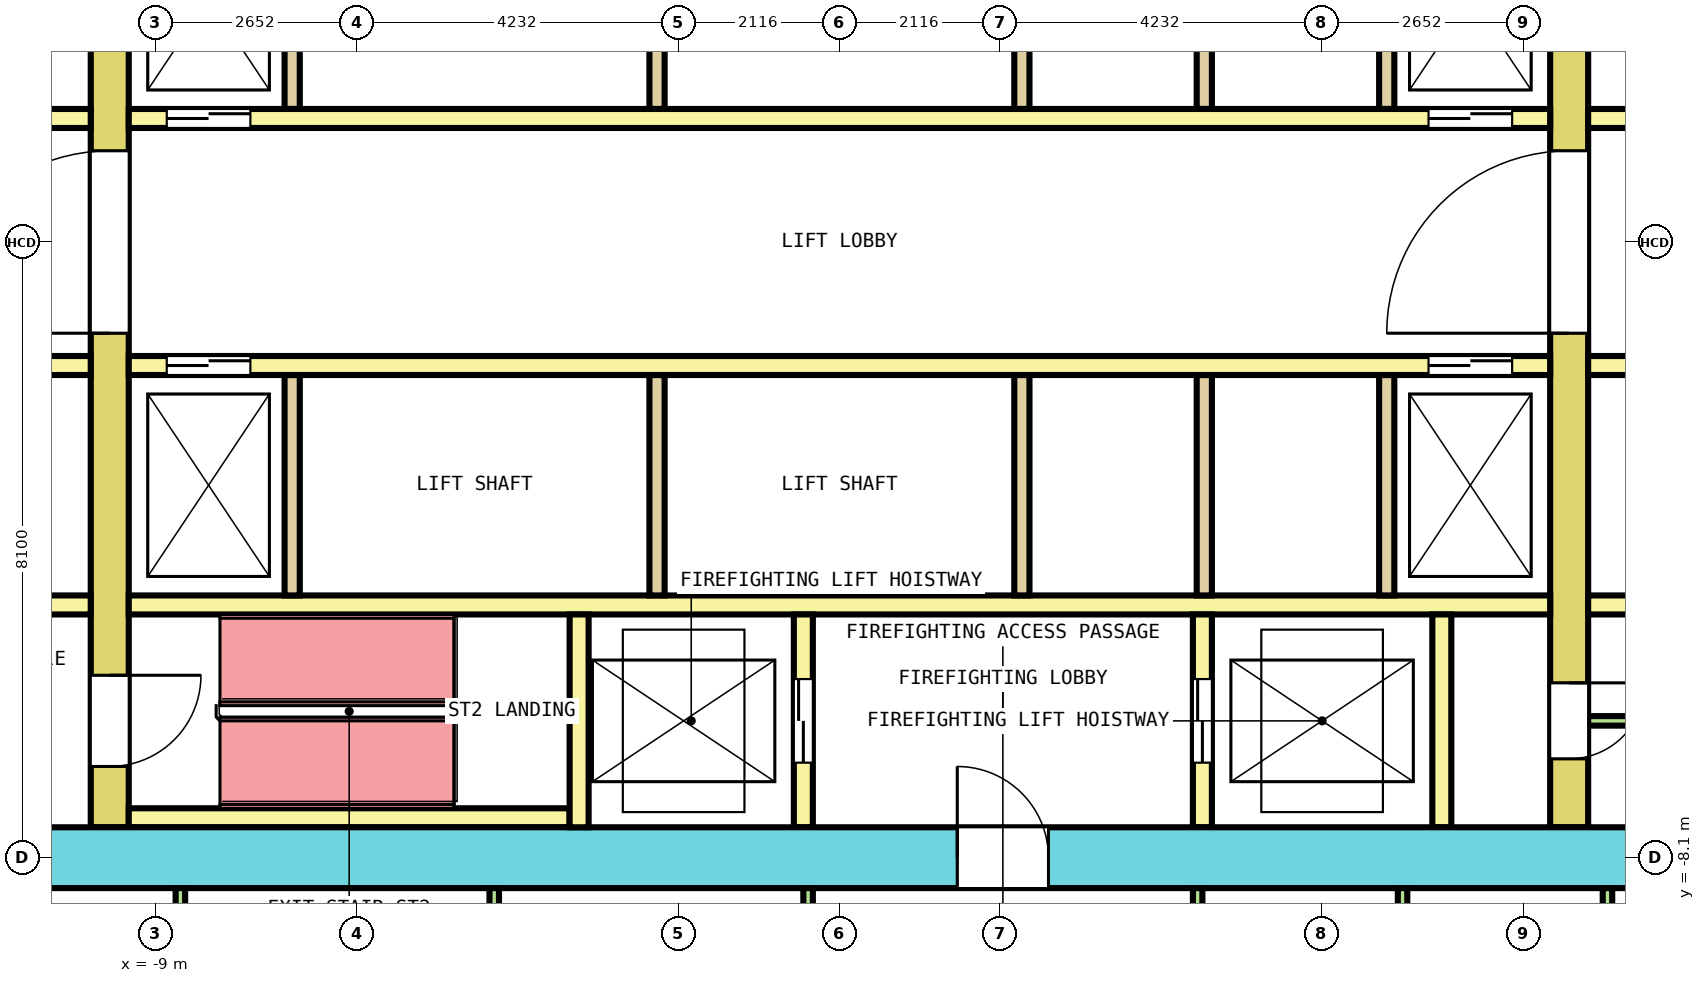
"""IFC4 building model, lengths in metres.
Left out: names, types, materials, properties, quantities, classifications, styles, units other than length and angle.
Written with IfcOpenShell. Run it as: python <this file> out.ifc"""

import sys

from ifc_helpers import new_model, si_unit, direction, frame, frame_2d, origin, place, context, subcontext, project, spatial, rectangle, extrude, element, fill, save


model = new_model("IFC4")
c1 = context("Model", 3, precision=1e-05, world=origin(), true_north=direction((0.0, 1.0)))
c2 = subcontext(c1, "Body", "Model", "MODEL_VIEW")
j1 = project(units=[si_unit("LENGTHUNIT", "METRE"), si_unit("PLANEANGLEUNIT", "RADIAN")], contexts=[c1])
p1 = place(None, origin())
s1 = spatial("IfcSite", under=j1, at=p1, CompositionType="ELEMENT")
p2 = place(p1, origin())
s2 = spatial("IfcBuilding", under=s1, at=p2, CompositionType="ELEMENT")
p3 = place(p2, frame((0.0, 0.0, 80.8)))
s3 = spatial("IfcBuildingStorey", under=s2, at=p3, CompositionType="ELEMENT", Elevation=80.8)
p4 = place(p3, frame((-12.8, -8.1, 0.0), z_axis=(0.0, 0.0, 1.0), x_axis=(1.0, 0.0, 0.0)))
e1 = element("IfcWall", 1, at=p4, inside=s3, PredefinedType="SHEAR", context=c2, shape_type="SweptSolid", body=[
    extrude(rectangle(XDim=25.6, YDim=0.8, at=frame_2d((12.8, 0.0))), origin(), (0.0, 0.0, 1.0), 4.1),
])
p5 = place(p4, frame((14.35, 0.0, 0.0)))
e2 = element("IfcOpeningElement", 2, at=p5, cuts=e1, PredefinedType="OPENING", context=c2, shape_type="SweptSolid", body=[
    extrude(rectangle(XDim=1.2, YDim=2.1, at=frame_2d((0.6, 1.05))), frame((0.0, 0.41, 0.0), z_axis=(0.0, -1.0, 0.0), x_axis=(1.0, 0.0, 0.0)), (0.0, 0.0, 1.0), 0.82),
])
p6 = place(p3, frame((-9.6, -7.7, 0.0), z_axis=(0.0, 0.0, 1.0), x_axis=(0.0, 1.0, 0.0)))
e3 = element("IfcWall", 3, at=p6, inside=s3, PredefinedType="SHEAR", context=c2, shape_type="SweptSolid", body=[
    extrude(rectangle(XDim=15.4, YDim=0.5, at=frame_2d((7.7, 0.0))), origin(), (0.0, 0.0, 1.0), 4.1),
])
p7 = place(p6, frame((6.5, 0.0, 0.0)))
e4 = element("IfcOpeningElement", 4, at=p7, cuts=e3, PredefinedType="OPENING", context=c2, shape_type="SweptSolid", body=[
    extrude(rectangle(XDim=2.4, YDim=2.1, at=frame_2d((1.2, 1.05))), frame((0.0, 0.26, 0.0), z_axis=(0.0, -1.0, 0.0), x_axis=(1.0, 0.0, 0.0)), (0.0, 0.0, 1.0), 0.52),
])
p8 = place(p6, frame((13.4, 0.0, 0.0)))
e5 = element("IfcOpeningElement", 5, at=p8, cuts=e3, PredefinedType="OPENING", context=c2, shape_type="SweptSolid", body=[
    extrude(rectangle(XDim=1.2, YDim=2.1, at=frame_2d((0.6, 1.05))), frame((0.0, 0.26, 0.0), z_axis=(0.0, -1.0, 0.0), x_axis=(1.0, 0.0, 0.0)), (0.0, 0.0, 1.0), 0.52),
])
p9 = place(p6, frame((0.8, 0.0, 0.0)))
e6 = element("IfcOpeningElement", 6, at=p9, cuts=e3, PredefinedType="OPENING", context=c2, shape_type="SweptSolid", body=[
    extrude(rectangle(XDim=1.2, YDim=2.1, at=frame_2d((0.6, 1.05))), frame((0.0, 0.26, 0.0), z_axis=(0.0, -1.0, 0.0), x_axis=(1.0, 0.0, 0.0)), (0.0, 0.0, 1.0), 0.52),
])
p10 = place(p3, frame((9.6, -7.7, 0.0), z_axis=(0.0, 0.0, 1.0), x_axis=(0.0, 1.0, 0.0)))
e7 = element("IfcWall", 7, at=p10, inside=s3, PredefinedType="SHEAR", context=c2, shape_type="SweptSolid", body=[
    extrude(rectangle(XDim=15.4, YDim=0.5, at=frame_2d((7.7, 0.0))), origin(), (0.0, 0.0, 1.0), 4.1),
])
p11 = place(p10, frame((6.5, 0.0, 0.0)))
e8 = element("IfcOpeningElement", 8, at=p11, cuts=e7, PredefinedType="OPENING", context=c2, shape_type="SweptSolid", body=[
    extrude(rectangle(XDim=2.4, YDim=2.1, at=frame_2d((1.2, 1.05))), frame((0.0, 0.26, 0.0), z_axis=(0.0, -1.0, 0.0), x_axis=(1.0, 0.0, 0.0)), (0.0, 0.0, 1.0), 0.52),
])
p12 = place(p10, frame((13.4, 0.0, 0.0)))
e9 = element("IfcOpeningElement", 9, at=p12, cuts=e7, PredefinedType="OPENING", context=c2, shape_type="SweptSolid", body=[
    extrude(rectangle(XDim=1.2, YDim=2.1, at=frame_2d((0.6, 1.05))), frame((0.0, 0.26, 0.0), z_axis=(0.0, -1.0, 0.0), x_axis=(1.0, 0.0, 0.0)), (0.0, 0.0, 1.0), 0.52),
])
p13 = place(p10, frame((0.9, 0.0, 0.0)))
e10 = element("IfcOpeningElement", 10, at=p13, cuts=e7, PredefinedType="OPENING", context=c2, shape_type="SweptSolid", body=[
    extrude(rectangle(XDim=1.0, YDim=2.1, at=frame_2d((0.5, 1.05))), frame((0.0, 0.26, 0.0), z_axis=(0.0, -1.0, 0.0), x_axis=(1.0, 0.0, 0.0)), (0.0, 0.0, 1.0), 0.52),
])
p14 = place(p3, frame((-12.8, 1.625, 0.0), z_axis=(0.0, 0.0, 1.0), x_axis=(1.0, 0.0, 0.0)))
e11 = element("IfcWall", 11, at=p14, inside=s3, PredefinedType="SOLIDWALL", context=c2, shape_type="SweptSolid", body=[
    extrude(rectangle(XDim=2.95, YDim=0.25, at=frame_2d((1.475, 0.0))), origin(), (0.0, 0.0, 1.0), 4.1),
])
p15 = place(p14, frame((0.925, 0.0, 0.0)))
e12 = element("IfcOpeningElement", 12, at=p15, cuts=e11, PredefinedType="OPENING", context=c2, shape_type="SweptSolid", body=[
    extrude(rectangle(XDim=1.1, YDim=2.1, at=frame_2d((0.55, 1.05))), frame((0.0, 0.135, 0.0), z_axis=(0.0, -1.0, 0.0), x_axis=(1.0, 0.0, 0.0)), (0.0, 0.0, 1.0), 0.27),
])
p16 = place(p3, frame((-9.35, 1.625, 0.0), z_axis=(0.0, 0.0, 1.0), x_axis=(1.0, 0.0, 0.0)))
e13 = element("IfcWall", 13, at=p16, inside=s3, PredefinedType="SOLIDWALL", context=c2, shape_type="SweptSolid", body=[
    extrude(rectangle(XDim=18.7, YDim=0.25, at=frame_2d((9.35, 0.0))), origin(), (0.0, 0.0, 1.0), 4.1),
])
p17 = place(p16, frame((0.5, 0.0, 0.0)))
e14 = element("IfcOpeningElement", 14, at=p17, cuts=e13, PredefinedType="OPENING", context=c2, shape_type="SweptSolid", body=[
    extrude(rectangle(XDim=1.1, YDim=2.1, at=frame_2d((0.55, 1.05))), frame((0.0, 0.135, 0.0), z_axis=(0.0, -1.0, 0.0), x_axis=(1.0, 0.0, 0.0)), (0.0, 0.0, 1.0), 0.27),
])
p18 = place(p16, frame((17.1, 0.0, 0.0)))
e15 = element("IfcOpeningElement", 15, at=p18, cuts=e13, PredefinedType="OPENING", context=c2, shape_type="SweptSolid", body=[
    extrude(rectangle(XDim=1.1, YDim=2.1, at=frame_2d((0.55, 1.05))), frame((0.0, 0.135, 0.0), z_axis=(0.0, -1.0, 0.0), x_axis=(1.0, 0.0, 0.0)), (0.0, 0.0, 1.0), 0.27),
])
p19 = place(p3, frame((9.85, 1.625, 0.0), z_axis=(0.0, 0.0, 1.0), x_axis=(1.0, 0.0, 0.0)))
e16 = element("IfcWall", 16, at=p19, inside=s3, PredefinedType="SOLIDWALL", context=c2, shape_type="SweptSolid", body=[
    extrude(rectangle(XDim=2.95, YDim=0.25, at=frame_2d((1.475, 0.0))), origin(), (0.0, 0.0, 1.0), 4.1),
])
p20 = place(p19, frame((0.925, 0.0, 0.0)))
e17 = element("IfcOpeningElement", 17, at=p20, cuts=e16, PredefinedType="OPENING", context=c2, shape_type="SweptSolid", body=[
    extrude(rectangle(XDim=1.1, YDim=2.1, at=frame_2d((0.55, 1.05))), frame((0.0, 0.135, 0.0), z_axis=(0.0, -1.0, 0.0), x_axis=(1.0, 0.0, 0.0)), (0.0, 0.0, 1.0), 0.27),
])
for number, where, z_axis, x_axis in (
    (18, (-7.2, 1.75, 0.0), (0.0, 0.0, 1.0), (0.0, 1.0, 0.0)),
    (19, (-2.4, 1.75, 0.0), (0.0, 0.0, 1.0), (0.0, 1.0, 0.0)),
    (20, (2.4, 1.75, 0.0), (0.0, 0.0, 1.0), (0.0, 1.0, 0.0)),
    (21, (4.8, 1.75, 0.0), (0.0, 0.0, 1.0), (0.0, 1.0, 0.0)),
    (22, (7.2, 1.75, 0.0), (0.0, 0.0, 1.0), (0.0, 1.0, 0.0)),
):
    element("IfcWall", number, at=place(p3, frame(where, z_axis=z_axis, x_axis=x_axis)), inside=s3, PredefinedType="SOLIDWALL", context=c2, shape_type="SweptSolid", body=[
        extrude(rectangle(XDim=2.9, YDim=0.2, at=frame_2d((1.45, 0.0))), origin(), (0.0, 0.0, 1.0), 4.1),
    ])
p21 = place(p3, frame((-12.8, -1.625, 0.0), z_axis=(0.0, 0.0, 1.0), x_axis=(1.0, 0.0, 0.0)))
e23 = element("IfcWall", 23, at=p21, inside=s3, PredefinedType="SOLIDWALL", context=c2, shape_type="SweptSolid", body=[
    extrude(rectangle(XDim=2.95, YDim=0.25, at=frame_2d((1.475, 0.0))), origin(), (0.0, 0.0, 1.0), 4.1),
])
p22 = place(p21, frame((0.925, 0.0, 0.0)))
e24 = element("IfcOpeningElement", 24, at=p22, cuts=e23, PredefinedType="OPENING", context=c2, shape_type="SweptSolid", body=[
    extrude(rectangle(XDim=1.1, YDim=2.1, at=frame_2d((0.55, 1.05))), frame((0.0, 0.135, 0.0), z_axis=(0.0, -1.0, 0.0), x_axis=(1.0, 0.0, 0.0)), (0.0, 0.0, 1.0), 0.27),
])
p23 = place(p3, frame((-9.35, -1.625, 0.0), z_axis=(0.0, 0.0, 1.0), x_axis=(1.0, 0.0, 0.0)))
e25 = element("IfcWall", 25, at=p23, inside=s3, PredefinedType="SOLIDWALL", context=c2, shape_type="SweptSolid", body=[
    extrude(rectangle(XDim=18.7, YDim=0.25, at=frame_2d((9.35, 0.0))), origin(), (0.0, 0.0, 1.0), 4.1),
])
p24 = place(p23, frame((0.5, 0.0, 0.0)))
e26 = element("IfcOpeningElement", 26, at=p24, cuts=e25, PredefinedType="OPENING", context=c2, shape_type="SweptSolid", body=[
    extrude(rectangle(XDim=1.1, YDim=2.1, at=frame_2d((0.55, 1.05))), frame((0.0, 0.135, 0.0), z_axis=(0.0, -1.0, 0.0), x_axis=(1.0, 0.0, 0.0)), (0.0, 0.0, 1.0), 0.27),
])
p25 = place(p23, frame((17.1, 0.0, 0.0)))
e27 = element("IfcOpeningElement", 27, at=p25, cuts=e25, PredefinedType="OPENING", context=c2, shape_type="SweptSolid", body=[
    extrude(rectangle(XDim=1.1, YDim=2.1, at=frame_2d((0.55, 1.05))), frame((0.0, 0.135, 0.0), z_axis=(0.0, -1.0, 0.0), x_axis=(1.0, 0.0, 0.0)), (0.0, 0.0, 1.0), 0.27),
])
p26 = place(p3, frame((9.85, -1.625, 0.0), z_axis=(0.0, 0.0, 1.0), x_axis=(1.0, 0.0, 0.0)))
e28 = element("IfcWall", 28, at=p26, inside=s3, PredefinedType="SOLIDWALL", context=c2, shape_type="SweptSolid", body=[
    extrude(rectangle(XDim=2.95, YDim=0.25, at=frame_2d((1.475, 0.0))), origin(), (0.0, 0.0, 1.0), 4.1),
])
p27 = place(p26, frame((0.925, 0.0, 0.0)))
e29 = element("IfcOpeningElement", 29, at=p27, cuts=e28, PredefinedType="OPENING", context=c2, shape_type="SweptSolid", body=[
    extrude(rectangle(XDim=1.1, YDim=2.1, at=frame_2d((0.55, 1.05))), frame((0.0, 0.135, 0.0), z_axis=(0.0, -1.0, 0.0), x_axis=(1.0, 0.0, 0.0)), (0.0, 0.0, 1.0), 0.27),
])
p28 = place(p3, frame((-12.8, -4.775, 0.0), z_axis=(0.0, 0.0, 1.0), x_axis=(1.0, 0.0, 0.0)))
e30 = element("IfcWall", 30, at=p28, inside=s3, PredefinedType="SOLIDWALL", context=c2, shape_type="SweptSolid", body=[
    extrude(rectangle(XDim=2.95, YDim=0.25, at=frame_2d((1.475, 0.0))), origin(), (0.0, 0.0, 1.0), 4.1),
])
p29 = place(p3, frame((-9.35, -4.775, 0.0), z_axis=(0.0, 0.0, 1.0), x_axis=(1.0, 0.0, 0.0)))
e31 = element("IfcWall", 31, at=p29, inside=s3, PredefinedType="SOLIDWALL", context=c2, shape_type="SweptSolid", body=[
    extrude(rectangle(XDim=18.7, YDim=0.25, at=frame_2d((9.35, 0.0))), origin(), (0.0, 0.0, 1.0), 4.1),
])
p30 = place(p3, frame((9.85, -4.775, 0.0), z_axis=(0.0, 0.0, 1.0), x_axis=(1.0, 0.0, 0.0)))
e32 = element("IfcWall", 32, at=p30, inside=s3, PredefinedType="SOLIDWALL", context=c2, shape_type="SweptSolid", body=[
    extrude(rectangle(XDim=2.95, YDim=0.25, at=frame_2d((1.475, 0.0))), origin(), (0.0, 0.0, 1.0), 4.1),
])
for number, where, z_axis, x_axis in (
    (33, (-7.2, -4.65, 0.0), (0.0, 0.0, 1.0), (0.0, 1.0, 0.0)),
    (34, (-2.4, -4.65, 0.0), (0.0, 0.0, 1.0), (0.0, 1.0, 0.0)),
    (35, (2.4, -4.65, 0.0), (0.0, 0.0, 1.0), (0.0, 1.0, 0.0)),
    (36, (4.8, -4.65, 0.0), (0.0, 0.0, 1.0), (0.0, 1.0, 0.0)),
    (37, (7.2, -4.65, 0.0), (0.0, 0.0, 1.0), (0.0, 1.0, 0.0)),
):
    element("IfcWall", number, at=place(p3, frame(where, z_axis=z_axis, x_axis=x_axis)), inside=s3, PredefinedType="SOLIDWALL", context=c2, shape_type="SweptSolid", body=[
        extrude(rectangle(XDim=2.9, YDim=0.2, at=frame_2d((1.45, 0.0))), origin(), (0.0, 0.0, 1.0), 4.1),
    ])
p31 = place(p3, frame((-9.35, -7.575, 0.0), z_axis=(0.0, 0.0, 1.0), x_axis=(1.0, 0.0, 0.0)))
e38 = element("IfcWall", 38, at=p31, inside=s3, PredefinedType="SOLIDWALL", context=c2, shape_type="SweptSolid", body=[
    extrude(rectangle(XDim=5.8, YDim=0.25, at=frame_2d((2.9, 0.0))), origin(), (0.0, 0.0, 1.0), 4.1),
])
p32 = place(p3, frame((-3.425, -7.7, 0.0), z_axis=(0.0, 0.0, 1.0), x_axis=(0.0, 1.0, 0.0)))
e39 = element("IfcWall", 39, at=p32, inside=s3, PredefinedType="SOLIDWALL", context=c2, shape_type="SweptSolid", body=[
    extrude(rectangle(XDim=2.8, YDim=0.25, at=frame_2d((1.4, 0.0))), origin(), (0.0, 0.0, 1.0), 4.1),
])
p33 = place(p3, frame((-0.475, -7.7, 0.0), z_axis=(0.0, 0.0, 1.0), x_axis=(0.0, 1.0, 0.0)))
e40 = element("IfcWall", 40, at=p33, inside=s3, PredefinedType="SOLIDWALL", context=c2, shape_type="SweptSolid", body=[
    extrude(rectangle(XDim=2.8, YDim=0.25, at=frame_2d((1.4, 0.0))), origin(), (0.0, 0.0, 1.0), 4.1),
])
p34 = place(p33, frame((0.85, 0.0, 0.0)))
e41 = element("IfcOpeningElement", 41, at=p34, cuts=e40, PredefinedType="OPENING", context=c2, shape_type="SweptSolid", body=[
    extrude(rectangle(XDim=1.1, YDim=2.1, at=frame_2d((0.55, 1.05))), frame((0.0, 0.135, 0.0), z_axis=(0.0, -1.0, 0.0), x_axis=(1.0, 0.0, 0.0)), (0.0, 0.0, 1.0), 0.27),
])
p35 = place(p3, frame((4.775, -7.7, 0.0), z_axis=(0.0, 0.0, 1.0), x_axis=(0.0, 1.0, 0.0)))
e42 = element("IfcWall", 42, at=p35, inside=s3, PredefinedType="SOLIDWALL", context=c2, shape_type="SweptSolid", body=[
    extrude(rectangle(XDim=2.8, YDim=0.25, at=frame_2d((1.4, 0.0))), origin(), (0.0, 0.0, 1.0), 4.1),
])
p36 = place(p35, frame((0.85, 0.0, 0.0)))
e43 = element("IfcOpeningElement", 43, at=p36, cuts=e42, PredefinedType="OPENING", context=c2, shape_type="SweptSolid", body=[
    extrude(rectangle(XDim=1.1, YDim=2.1, at=frame_2d((0.55, 1.05))), frame((0.0, 0.135, 0.0), z_axis=(0.0, -1.0, 0.0), x_axis=(1.0, 0.0, 0.0)), (0.0, 0.0, 1.0), 0.27),
])
p37 = place(p3, frame((7.925, -7.7, 0.0), z_axis=(0.0, 0.0, 1.0), x_axis=(0.0, 1.0, 0.0)))
e44 = element("IfcWall", 44, at=p37, inside=s3, PredefinedType="SOLIDWALL", context=c2, shape_type="SweptSolid", body=[
    extrude(rectangle(XDim=2.8, YDim=0.25, at=frame_2d((1.4, 0.0))), origin(), (0.0, 0.0, 1.0), 4.1),
])
p38 = place(p3, frame((9.85, -6.3, 0.0), z_axis=(0.0, 0.0, 1.0), x_axis=(1.0, 0.0, 0.0)))
e45 = element("IfcWall", 45, at=p38, inside=s3, PredefinedType="PARTITIONING", context=c2, shape_type="SweptSolid", body=[
    extrude(rectangle(XDim=2.95, YDim=0.125, at=frame_2d((1.475, 0.0))), origin(), (0.0, 0.0, 1.0), 4.1),
])
for number, where, z_axis, x_axis in (
    (46, (-8.671, -10.4, 0.0), (0.0, 0.0, 1.0), (0.0, 1.0, 0.0)),
    (47, (-4.542, -10.4, 0.0), (0.0, 0.0, 1.0), (0.0, 1.0, 0.0)),
    (48, (-0.413, -10.4, 0.0), (0.0, 0.0, 1.0), (0.0, 1.0, 0.0)),
    (49, (4.712, -10.4, 0.0), (0.0, 0.0, 1.0), (0.0, 1.0, 0.0)),
    (50, (7.408, -10.4, 0.0), (0.0, 0.0, 1.0), (0.0, 1.0, 0.0)),
    (51, (10.104, -10.4, 0.0), (0.0, 0.0, 1.0), (0.0, 1.0, 0.0)),
):
    element("IfcWall", number, at=place(p3, frame(where, z_axis=z_axis, x_axis=x_axis)), inside=s3, PredefinedType="PARTITIONING", context=c2, shape_type="SweptSolid", body=[
        extrude(rectangle(XDim=1.9, YDim=0.125, at=frame_2d((0.95, 0.0))), origin(), (0.0, 0.0, 1.0), 4.1),
    ])
p39 = place(p17, origin())
e52 = element("IfcDoor", 52, at=p39, inside=s3, OperationType="DOUBLE_DOOR_SLIDING", PredefinedType="DOOR", context=c2, shape_type="SweptSolid", body=[
    extrude(rectangle(XDim=1.1, YDim=2.1, at=frame_2d((0.55, 1.05))), frame((0.0, 0.075, 0.0), z_axis=(0.0, -1.0, 0.0), x_axis=(1.0, 0.0, 0.0)), (0.0, 0.0, 1.0), 0.15),
])
fill(e14, e52)
p40 = place(p18, origin())
e53 = element("IfcDoor", 53, at=p40, inside=s3, OperationType="DOUBLE_DOOR_SLIDING", PredefinedType="DOOR", context=c2, shape_type="SweptSolid", body=[
    extrude(rectangle(XDim=1.1, YDim=2.1, at=frame_2d((0.55, 1.05))), frame((0.0, 0.075, 0.0), z_axis=(0.0, -1.0, 0.0), x_axis=(1.0, 0.0, 0.0)), (0.0, 0.0, 1.0), 0.15),
])
fill(e15, e53)
p41 = place(p24, origin())
e54 = element("IfcDoor", 54, at=p41, inside=s3, OperationType="DOUBLE_DOOR_SLIDING", PredefinedType="DOOR", context=c2, shape_type="SweptSolid", body=[
    extrude(rectangle(XDim=1.1, YDim=2.1, at=frame_2d((0.55, 1.05))), frame((0.0, 0.075, 0.0), z_axis=(0.0, -1.0, 0.0), x_axis=(1.0, 0.0, 0.0)), (0.0, 0.0, 1.0), 0.15),
])
fill(e26, e54)
p42 = place(p25, origin())
e55 = element("IfcDoor", 55, at=p42, inside=s3, OperationType="DOUBLE_DOOR_SLIDING", PredefinedType="DOOR", context=c2, shape_type="SweptSolid", body=[
    extrude(rectangle(XDim=1.1, YDim=2.1, at=frame_2d((0.55, 1.05))), frame((0.0, 0.075, 0.0), z_axis=(0.0, -1.0, 0.0), x_axis=(1.0, 0.0, 0.0)), (0.0, 0.0, 1.0), 0.15),
])
fill(e27, e55)
p43 = place(p34, origin())
e56 = element("IfcDoor", 56, at=p43, inside=s3, OperationType="DOUBLE_DOOR_SLIDING", PredefinedType="DOOR", context=c2, shape_type="SweptSolid", body=[
    extrude(rectangle(XDim=1.1, YDim=2.1, at=frame_2d((0.55, 1.05))), frame((0.0, 0.075, 0.0), z_axis=(0.0, -1.0, 0.0), x_axis=(1.0, 0.0, 0.0)), (0.0, 0.0, 1.0), 0.15),
])
fill(e41, e56)
p44 = place(p36, origin())
e57 = element("IfcDoor", 57, at=p44, inside=s3, OperationType="DOUBLE_DOOR_SLIDING", PredefinedType="DOOR", context=c2, shape_type="SweptSolid", body=[
    extrude(rectangle(XDim=1.1, YDim=2.1, at=frame_2d((0.55, 1.05))), frame((0.0, 0.075, 0.0), z_axis=(0.0, -1.0, 0.0), x_axis=(1.0, 0.0, 0.0)), (0.0, 0.0, 1.0), 0.15),
])
fill(e43, e57)
p45 = place(p7, origin())
e58 = element("IfcDoor", 58, at=p45, inside=s3, OperationType="DOUBLE_DOOR_SINGLE_SWING", PredefinedType="DOOR", context=c2, shape_type="SweptSolid", body=[
    extrude(rectangle(XDim=2.4, YDim=2.1, at=frame_2d((1.2, 1.05))), frame((0.0, 0.2, 0.0), z_axis=(0.0, -1.0, 0.0), x_axis=(1.0, 0.0, 0.0)), (0.0, 0.0, 1.0), 0.4),
])
fill(e4, e58)
p46 = place(p11, origin())
e59 = element("IfcDoor", 59, at=p46, inside=s3, OperationType="DOUBLE_DOOR_SINGLE_SWING", PredefinedType="DOOR", context=c2, shape_type="SweptSolid", body=[
    extrude(rectangle(XDim=2.4, YDim=2.1, at=frame_2d((1.2, 1.05))), frame((0.0, 0.2, 0.0), z_axis=(0.0, -1.0, 0.0), x_axis=(1.0, 0.0, 0.0)), (0.0, 0.0, 1.0), 0.4),
])
fill(e8, e59)
p47 = place(p9, origin())
e60 = element("IfcDoor", 60, at=p47, inside=s3, OperationType="SINGLE_SWING_LEFT", PredefinedType="DOOR", context=c2, shape_type="SweptSolid", body=[
    extrude(rectangle(XDim=1.2, YDim=2.1, at=frame_2d((0.6, 1.05))), frame((0.0, 0.2, 0.0), z_axis=(0.0, -1.0, 0.0), x_axis=(1.0, 0.0, 0.0)), (0.0, 0.0, 1.0), 0.4),
])
fill(e6, e60)
p48 = place(p5, origin())
e61 = element("IfcDoor", 61, at=p48, inside=s3, OperationType="SINGLE_SWING_LEFT", PredefinedType="DOOR", context=c2, shape_type="SweptSolid", body=[
    extrude(rectangle(XDim=1.2, YDim=2.1, at=frame_2d((0.6, 1.05))), frame((0.0, 0.3, 0.0), z_axis=(0.0, -1.0, 0.0), x_axis=(1.0, 0.0, 0.0)), (0.0, 0.0, 1.0), 0.6),
])
fill(e2, e61)
p49 = place(p13, origin())
e62 = element("IfcDoor", 62, at=p49, inside=s3, OperationType="SINGLE_SWING_LEFT", PredefinedType="DOOR", context=c2, shape_type="SweptSolid", body=[
    extrude(rectangle(XDim=1.0, YDim=2.1, at=frame_2d((0.5, 1.05))), frame((0.0, 0.2, 0.0), z_axis=(0.0, -1.0, 0.0), x_axis=(1.0, 0.0, 0.0)), (0.0, 0.0, 1.0), 0.4),
])
fill(e10, e62)
save(model, sys.argv[1])
